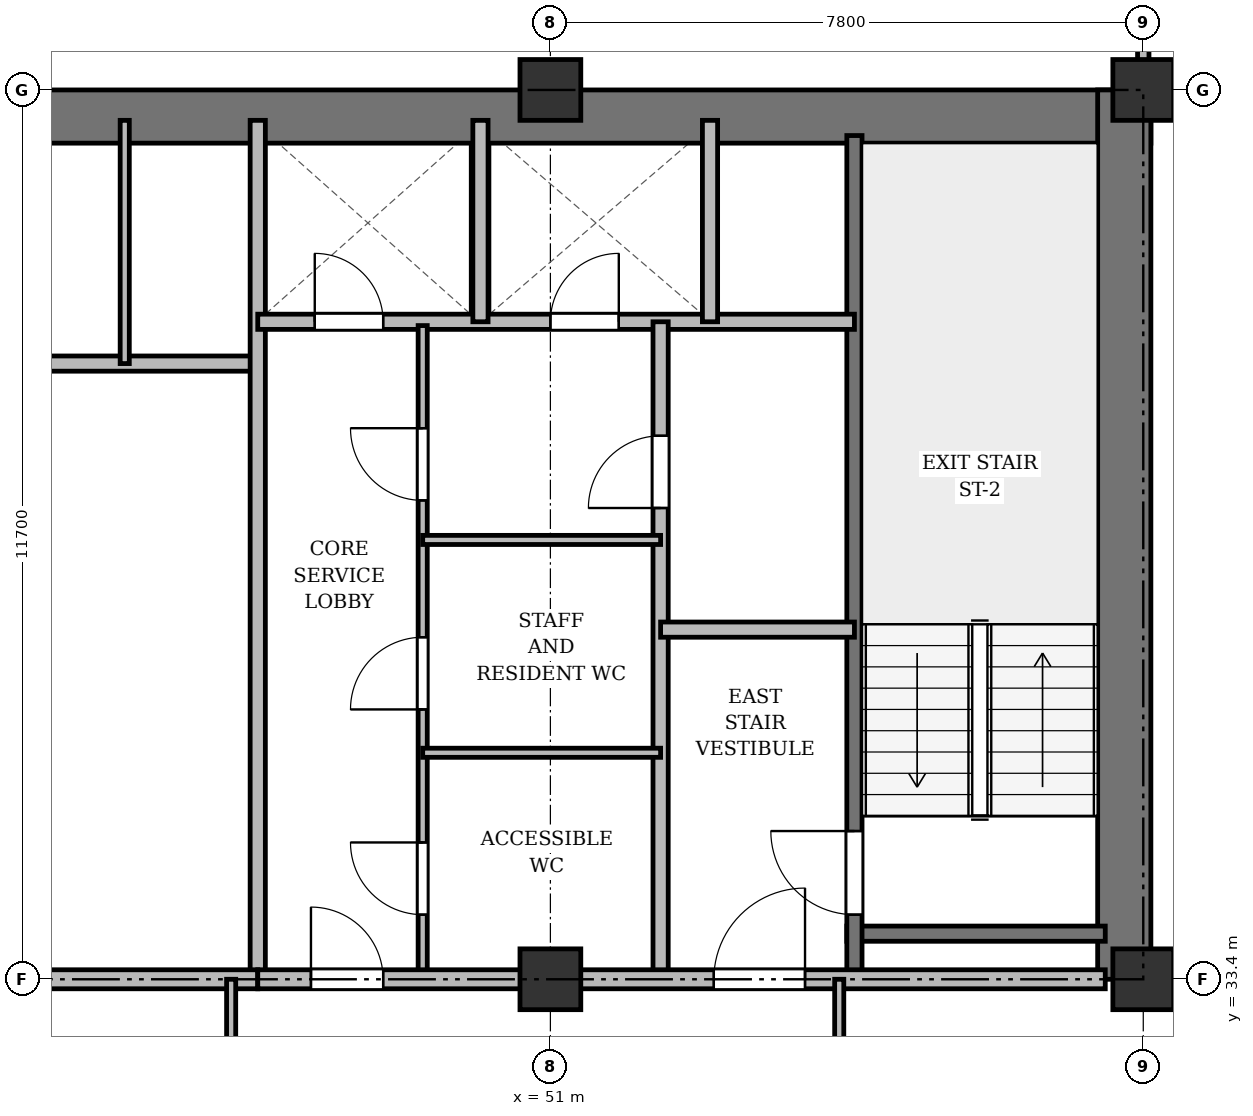
"""IFC4 building model, lengths in metres.
Left out: names, types, materials, properties, quantities, classifications, styles, units other than length and angle.
Written with IfcOpenShell. Run it as: python <this file> out.ifc"""

import sys

from ifc_helpers import new_model, si_unit, direction, frame, frame_2d, origin, origin_2d, place, context, subcontext, project, spatial, rectangle, extrude, source, transform, mapped, element, fill, save


model = new_model("IFC4")
c1 = context("Model", 3, precision=1e-05, world=origin(), true_north=direction((0.0, 1.0)))
c2 = subcontext(c1, "Body", "Model", "MODEL_VIEW")
j1 = project(units=[si_unit("LENGTHUNIT", "METRE"), si_unit("PLANEANGLEUNIT", "RADIAN")], contexts=[c1])
p1 = place(None, origin())
s1 = spatial("IfcSite", under=j1, at=p1, CompositionType="ELEMENT")
p2 = place(p1, origin())
s2 = spatial("IfcBuilding", under=s1, at=p2, CompositionType="ELEMENT")
p3 = place(p2, frame((0.0, 0.0, 99.7)))
s3 = spatial("IfcBuildingStorey", under=s2, at=p3, CompositionType="ELEMENT", Elevation=99.7)
m1 = source(origin(), c2, "Body", "SweptSolid", [
    extrude(rectangle(XDim=0.8, YDim=0.8, at=origin_2d()), origin(), (0.0, 0.0, 1.0), 3.6),
])
for number, where, z_axis, x_axis in (
    (1, (51.0, 33.4, 0.0), (0.0, 0.0, 1.0), (1.0, 0.0, 0.0)),
    (2, (51.0, 45.1, 0.0), (0.0, 0.0, 1.0), (1.0, 0.0, 0.0)),
    (3, (58.8, 33.4, 0.0), (0.0, 0.0, 1.0), (1.0, 0.0, 0.0)),
    (4, (58.8, 45.1, 0.0), (0.0, 0.0, 1.0), (1.0, 0.0, 0.0)),
):
    element("IfcColumn", number, at=place(p3, frame(where, z_axis=z_axis, x_axis=x_axis)), inside=s3, PredefinedType="COLUMN", context=c2, shape_type="MappedRepresentation", body=[
        mapped(m1, transform((0.0, 0.0, 0.0), x_axis=(1.0, 0.0, 0.0), y_axis=(0.0, 1.0, 0.0), z_axis=(0.0, 0.0, 1.0), scale=1.0)),
    ])
p4 = place(p3, frame((15.5, 44.75, 0.0), z_axis=(0.0, 0.0, 1.0), x_axis=(1.0, 0.0, 0.0)))
e5 = element("IfcWall", 5, at=p4, inside=s3, PredefinedType="SHEAR", context=c2, shape_type="SweptSolid", body=[
    extrude(rectangle(XDim=43.4, YDim=0.7, at=frame_2d((21.7, 0.0))), origin(), (0.0, 0.0, 1.0), 3.34),
])
p5 = place(p3, frame((58.55, 33.4, 0.0), z_axis=(0.0, 0.0, 1.0), x_axis=(0.0, 1.0, 0.0)))
e6 = element("IfcWall", 6, at=p5, inside=s3, PredefinedType="SHEAR", context=c2, shape_type="SweptSolid", body=[
    extrude(rectangle(XDim=11.7, YDim=0.7, at=frame_2d((5.85, 0.0))), origin(), (0.0, 0.0, 1.0), 3.34),
])
p6 = place(p3, frame((54.9, 34.0, 0.0), z_axis=(0.0, 0.0, 1.0), x_axis=(1.0, 0.0, 0.0)))
e7 = element("IfcWall", 7, at=p6, inside=s3, PredefinedType="SHEAR", context=c2, shape_type="SweptSolid", body=[
    extrude(rectangle(XDim=3.4, YDim=0.2, at=frame_2d((1.7, 0.0))), origin(), (0.0, 0.0, 1.0), 3.34),
])
p7 = place(p3, frame((55.0, 33.4, 0.0), z_axis=(0.0, 0.0, 1.0), x_axis=(0.0, 1.0, 0.0)))
e8 = element("IfcWall", 8, at=p7, inside=s3, PredefinedType="SHEAR", context=c2, shape_type="SweptSolid", body=[
    extrude(rectangle(XDim=11.1, YDim=0.2, at=frame_2d((5.55, 0.0))), origin(), (0.0, 0.0, 1.0), 3.34),
])
p8 = place(p7, frame((0.85, 0.0, 0.0)))
e9 = element("IfcOpeningElement", 9, at=p8, cuts=e8, PredefinedType="OPENING", context=c2, shape_type="SweptSolid", body=[
    extrude(rectangle(XDim=1.1, YDim=2.15, at=frame_2d((0.55, 1.075))), frame((0.0, 0.11, 0.0), z_axis=(0.0, -1.0, 0.0), x_axis=(1.0, 0.0, 0.0)), (0.0, 0.0, 1.0), 0.22),
])
p9 = place(p3, frame((40.25, 41.5, 0.0), z_axis=(0.0, 0.0, 1.0), x_axis=(1.0, 0.0, 0.0)))
e10 = element("IfcWall", 10, at=p9, inside=s3, PredefinedType="SOLIDWALL", context=c2, shape_type="SweptSolid", body=[
    extrude(rectangle(XDim=6.9, YDim=0.2, at=frame_2d((3.45, 0.0))), origin(), (0.0, 0.0, 1.0), 2.84),
])
p10 = place(p3, frame((45.4, 41.5, 0.0), z_axis=(0.0, 0.0, 1.0), x_axis=(0.0, 1.0, 0.0)))
e11 = element("IfcWall", 11, at=p10, inside=s3, PredefinedType="PARTITIONING", context=c2, shape_type="SweptSolid", body=[
    extrude(rectangle(XDim=3.2, YDim=0.12, at=frame_2d((1.6, 0.0))), origin(), (0.0, 0.0, 1.0), 3.34),
])
p11 = place(p3, frame((47.15, 33.4, 0.0), z_axis=(0.0, 0.0, 1.0), x_axis=(0.0, 1.0, 0.0)))
e12 = element("IfcWall", 12, at=p11, inside=s3, PredefinedType="SOLIDWALL", context=c2, shape_type="SweptSolid", body=[
    extrude(rectangle(XDim=11.3, YDim=0.2, at=frame_2d((5.65, 0.0))), origin(), (0.0, 0.0, 1.0), 2.752),
])
p12 = place(p3, frame((26.3, 33.4, 0.0), z_axis=(0.0, 0.0, 1.0), x_axis=(1.0, 0.0, 0.0)))
e13 = element("IfcWall", 13, at=p12, inside=s3, PredefinedType="PARTITIONING", context=c2, shape_type="SweptSolid", body=[
    extrude(rectangle(XDim=20.85, YDim=0.25, at=frame_2d((10.425, 0.0))), origin(), (0.0, 0.0, 1.0), 2.752),
])
p13 = place(p12, frame((9.2, 0.0, 0.0)))
e14 = element("IfcOpeningElement", 14, at=p13, cuts=e13, PredefinedType="OPENING", context=c2, shape_type="SweptSolid", body=[
    extrude(rectangle(XDim=1.6, YDim=2.2, at=frame_2d((0.8, 1.1))), frame((0.0, 0.135, 0.0), z_axis=(0.0, -1.0, 0.0), x_axis=(1.0, 0.0, 0.0)), (0.0, 0.0, 1.0), 0.27),
])
p14 = place(p3, frame((47.15, 42.05, 0.0), z_axis=(0.0, 0.0, 1.0), x_axis=(1.0, 0.0, 0.0)))
e15 = element("IfcWall", 15, at=p14, inside=s3, PredefinedType="SOLIDWALL", context=c2, shape_type="SweptSolid", body=[
    extrude(rectangle(XDim=7.85, YDim=0.2, at=frame_2d((3.925, 0.0))), origin(), (0.0, 0.0, 1.0), 2.84),
])
p15 = place(p14, frame((0.75, 0.0, 0.0)))
e16 = element("IfcOpeningElement", 16, at=p15, cuts=e15, PredefinedType="OPENING", context=c2, shape_type="SweptSolid", body=[
    extrude(rectangle(XDim=0.9, YDim=2.1, at=frame_2d((0.45, 1.05))), frame((0.0, 0.11, 0.0), z_axis=(0.0, -1.0, 0.0), x_axis=(1.0, 0.0, 0.0)), (0.0, 0.0, 1.0), 0.22),
])
p16 = place(p14, frame((3.85, 0.0, 0.0)))
e17 = element("IfcOpeningElement", 17, at=p16, cuts=e15, PredefinedType="OPENING", context=c2, shape_type="SweptSolid", body=[
    extrude(rectangle(XDim=0.9, YDim=2.1, at=frame_2d((0.45, 1.05))), frame((0.0, 0.11, 0.0), z_axis=(0.0, -1.0, 0.0), x_axis=(1.0, 0.0, 0.0)), (0.0, 0.0, 1.0), 0.22),
])
for number, where, z_axis, x_axis in (
    (18, (50.08, 42.05, 0.0), (0.0, 0.0, 1.0), (0.0, 1.0, 0.0)),
    (19, (53.1, 42.05, 0.0), (0.0, 0.0, 1.0), (0.0, 1.0, 0.0)),
):
    element("IfcWall", number, at=place(p3, frame(where, z_axis=z_axis, x_axis=x_axis)), inside=s3, PredefinedType="SOLIDWALL", context=c2, shape_type="SweptSolid", body=[
        extrude(rectangle(XDim=2.65, YDim=0.2, at=frame_2d((1.325, 0.0))), origin(), (0.0, 0.0, 1.0), 3.34),
    ])
p17 = place(p3, frame((52.45, 33.4, 0.0), z_axis=(0.0, 0.0, 1.0), x_axis=(0.0, 1.0, 0.0)))
e20 = element("IfcWall", 20, at=p17, inside=s3, PredefinedType="PARTITIONING", context=c2, shape_type="SweptSolid", body=[
    extrude(rectangle(XDim=8.65, YDim=0.2, at=frame_2d((4.325, 0.0))), origin(), (0.0, 0.0, 1.0), 2.752),
])
p18 = place(p17, frame((6.2, 0.0, 0.0)))
e21 = element("IfcOpeningElement", 21, at=p18, cuts=e20, PredefinedType="OPENING", context=c2, shape_type="SweptSolid", body=[
    extrude(rectangle(XDim=0.95, YDim=2.15, at=frame_2d((0.475, 1.075))), frame((0.0, 0.11, 0.0), z_axis=(0.0, -1.0, 0.0), x_axis=(1.0, 0.0, 0.0)), (0.0, 0.0, 1.0), 0.22),
])
p19 = place(p3, frame((52.45, 38.0, 0.0), z_axis=(0.0, 0.0, 1.0), x_axis=(1.0, 0.0, 0.0)))
e22 = element("IfcWall", 22, at=p19, inside=s3, PredefinedType="PARTITIONING", context=c2, shape_type="SweptSolid", body=[
    extrude(rectangle(XDim=2.55, YDim=0.2, at=frame_2d((1.275, 0.0))), origin(), (0.0, 0.0, 1.0), 3.34),
])
p20 = place(p3, frame((49.32, 33.4, 0.0), z_axis=(0.0, 0.0, 1.0), x_axis=(0.0, 1.0, 0.0)))
e23 = element("IfcWall", 23, at=p20, inside=s3, PredefinedType="PARTITIONING", context=c2, shape_type="SweptSolid", body=[
    extrude(rectangle(XDim=8.6, YDim=0.12, at=frame_2d((4.3, 0.0))), origin(), (0.0, 0.0, 1.0), 2.752),
])
p21 = place(p20, frame((0.85, 0.0, 0.0)))
e24 = element("IfcOpeningElement", 24, at=p21, cuts=e23, PredefinedType="OPENING", context=c2, shape_type="SweptSolid", body=[
    extrude(rectangle(XDim=0.95, YDim=2.15, at=frame_2d((0.475, 1.075))), frame((0.0, 0.07, 0.0), z_axis=(0.0, -1.0, 0.0), x_axis=(1.0, 0.0, 0.0)), (0.0, 0.0, 1.0), 0.14),
])
p22 = place(p20, frame((3.55, 0.0, 0.0)))
e25 = element("IfcOpeningElement", 25, at=p22, cuts=e23, PredefinedType="OPENING", context=c2, shape_type="SweptSolid", body=[
    extrude(rectangle(XDim=0.95, YDim=2.15, at=frame_2d((0.475, 1.075))), frame((0.0, 0.07, 0.0), z_axis=(0.0, -1.0, 0.0), x_axis=(1.0, 0.0, 0.0)), (0.0, 0.0, 1.0), 0.14),
])
p23 = place(p20, frame((6.3, 0.0, 0.0)))
e26 = element("IfcOpeningElement", 26, at=p23, cuts=e23, PredefinedType="OPENING", context=c2, shape_type="SweptSolid", body=[
    extrude(rectangle(XDim=0.95, YDim=2.15, at=frame_2d((0.475, 1.075))), frame((0.0, 0.07, 0.0), z_axis=(0.0, -1.0, 0.0), x_axis=(1.0, 0.0, 0.0)), (0.0, 0.0, 1.0), 0.14),
])
for number, where, z_axis, x_axis in (
    (27, (49.32, 36.38, 0.0), (0.0, 0.0, 1.0), (1.0, 0.0, 0.0)),
    (28, (49.32, 39.18, 0.0), (0.0, 0.0, 1.0), (1.0, 0.0, 0.0)),
):
    element("IfcWall", number, at=place(p3, frame(where, z_axis=z_axis, x_axis=x_axis)), inside=s3, PredefinedType="PARTITIONING", context=c2, shape_type="SweptSolid", body=[
        extrude(rectangle(XDim=3.13, YDim=0.12, at=frame_2d((1.565, 0.0))), origin(), (0.0, 0.0, 1.0), 2.84),
    ])
p24 = place(p3, frame((47.15, 33.4, 0.0), z_axis=(0.0, 0.0, 1.0), x_axis=(1.0, 0.0, 0.0)))
e29 = element("IfcWall", 29, at=p24, inside=s3, PredefinedType="PARTITIONING", context=c2, shape_type="SweptSolid", body=[
    extrude(rectangle(XDim=11.15, YDim=0.25, at=frame_2d((5.575, 0.0))), origin(), (0.0, 0.0, 1.0), 2.752),
])
p25 = place(p24, frame((0.7, 0.0, 0.0)))
e30 = element("IfcOpeningElement", 30, at=p25, cuts=e29, PredefinedType="OPENING", context=c2, shape_type="SweptSolid", body=[
    extrude(rectangle(XDim=0.95, YDim=2.15, at=frame_2d((0.475, 1.075))), frame((0.0, 0.135, 0.0), z_axis=(0.0, -1.0, 0.0), x_axis=(1.0, 0.0, 0.0)), (0.0, 0.0, 1.0), 0.27),
])
p26 = place(p24, frame((6.0, 0.0, 0.0)))
e31 = element("IfcOpeningElement", 31, at=p26, cuts=e29, PredefinedType="OPENING", context=c2, shape_type="SweptSolid", body=[
    extrude(rectangle(XDim=1.2, YDim=2.15, at=frame_2d((0.6, 1.075))), frame((0.0, 0.135, 0.0), z_axis=(0.0, -1.0, 0.0), x_axis=(1.0, 0.0, 0.0)), (0.0, 0.0, 1.0), 0.27),
])
for number, where, z_axis, x_axis in (
    (32, (46.8, 29.8, 0.0), (0.0, 0.0, 1.0), (0.0, 1.0, 0.0)),
    (33, (54.8, 29.8, 0.0), (0.0, 0.0, 1.0), (0.0, 1.0, 0.0)),
):
    element("IfcWall", number, at=place(p3, frame(where, z_axis=z_axis, x_axis=x_axis)), inside=s3, PredefinedType="PARTITIONING", context=c2, shape_type="SweptSolid", body=[
        extrude(rectangle(XDim=3.6, YDim=0.12, at=frame_2d((1.8, 0.0))), origin(), (0.0, 0.0, 1.0), 2.752),
    ])
p27 = place(p3, frame((58.8, 33.4, 0.0), z_axis=(0.0, 0.0, 1.0), x_axis=(1.0, 0.0, 0.0)))
e34 = element("IfcWall", 34, at=p27, inside=s3, PredefinedType="PARTITIONING", context=c2, shape_type="SweptSolid", body=[
    extrude(rectangle(XDim=10.85, YDim=0.15, at=frame_2d((5.425, 0.0))), origin(), (0.0, 0.0, 1.0), 2.752),
])
p28 = place(p27, frame((4.76, 0.0, 0.0)))
e35 = element("IfcOpeningElement", 35, at=p28, cuts=e34, PredefinedType="OPENING", context=c2, shape_type="SweptSolid", body=[
    extrude(rectangle(XDim=0.95, YDim=2.15, at=frame_2d((0.475, 1.075))), frame((0.0, 0.085, 0.0), z_axis=(0.0, -1.0, 0.0), x_axis=(1.0, 0.0, 0.0)), (0.0, 0.0, 1.0), 0.17),
])
p29 = place(p3, frame((58.8, 44.75, 0.0), z_axis=(0.0, 0.0, 1.0), x_axis=(0.0, 1.0, 0.0)))
e36 = element("IfcWall", 36, at=p29, inside=s3, PredefinedType="PARTITIONING", context=c2, shape_type="SweptSolid", body=[
    extrude(rectangle(XDim=3.61, YDim=0.15, at=frame_2d((1.805, 0.0))), origin(), (0.0, 0.0, 1.0), 2.84),
])
p30 = place(p29, frame((1.1, 0.0, 0.0)))
e37 = element("IfcOpeningElement", 37, at=p30, cuts=e36, PredefinedType="OPENING", context=c2, shape_type="SweptSolid", body=[
    extrude(rectangle(XDim=0.95, YDim=2.15, at=frame_2d((0.475, 1.075))), frame((0.0, 0.085, 0.0), z_axis=(0.0, -1.0, 0.0), x_axis=(1.0, 0.0, 0.0)), (0.0, 0.0, 1.0), 0.17),
])
m2 = source(origin(), c2, "Body", "SweptSolid", [
    extrude(rectangle(XDim=1.1, YDim=2.15, at=frame_2d((0.55, 1.075))), frame((0.0, 0.025, 0.0), z_axis=(0.0, -1.0, 0.0), x_axis=(1.0, 0.0, 0.0)), (0.0, 0.0, 1.0), 0.05),
])
p31 = place(p8, origin())
e38 = element("IfcDoor", 38, at=p31, inside=s3, OperationType="SINGLE_SWING_RIGHT", PredefinedType="DOOR", context=c2, shape_type="MappedRepresentation", body=[
    mapped(m2, transform((0.0, 0.0, 0.0), x_axis=(1.0, 0.0, 0.0), y_axis=(0.0, 1.0, 0.0), z_axis=(0.0, 0.0, 1.0), scale=1.0)),
])
fill(e9, e38)
m3 = source(origin(), c2, "Body", "SweptSolid", [
    extrude(rectangle(XDim=0.9, YDim=2.1, at=frame_2d((0.45, 1.05))), frame((0.0, 0.025, 0.0), z_axis=(0.0, -1.0, 0.0), x_axis=(1.0, 0.0, 0.0)), (0.0, 0.0, 1.0), 0.05),
])
p32 = place(p15, origin())
e39 = element("IfcDoor", 39, at=p32, inside=s3, OperationType="SINGLE_SWING_LEFT", PredefinedType="DOOR", context=c2, shape_type="MappedRepresentation", body=[
    mapped(m3, transform((0.0, 0.0, 0.0), x_axis=(1.0, 0.0, 0.0), y_axis=(0.0, 1.0, 0.0), z_axis=(0.0, 0.0, 1.0), scale=1.0)),
])
fill(e16, e39)
p33 = place(p16, origin())
e40 = element("IfcDoor", 40, at=p33, inside=s3, OperationType="SINGLE_SWING_RIGHT", PredefinedType="DOOR", context=c2, shape_type="MappedRepresentation", body=[
    mapped(m3, transform((0.0, 0.0, 0.0), x_axis=(1.0, 0.0, 0.0), y_axis=(0.0, 1.0, 0.0), z_axis=(0.0, 0.0, 1.0), scale=1.0)),
])
fill(e17, e40)
m4 = source(origin(), c2, "Body", "SweptSolid", [
    extrude(rectangle(XDim=0.95, YDim=2.15, at=frame_2d((0.475, 1.075))), frame((0.0, 0.025, 0.0), z_axis=(0.0, -1.0, 0.0), x_axis=(1.0, 0.0, 0.0)), (0.0, 0.0, 1.0), 0.05),
])
p34 = place(p18, origin())
e41 = element("IfcDoor", 41, at=p34, inside=s3, OperationType="SINGLE_SWING_LEFT", PredefinedType="DOOR", context=c2, shape_type="MappedRepresentation", body=[
    mapped(m4, transform((0.0, 0.0, 0.0), x_axis=(1.0, 0.0, 0.0), y_axis=(0.0, 1.0, 0.0), z_axis=(0.0, 0.0, 1.0), scale=1.0)),
])
fill(e21, e41)
p35 = place(p21, origin())
e42 = element("IfcDoor", 42, at=p35, inside=s3, OperationType="SINGLE_SWING_RIGHT", PredefinedType="DOOR", context=c2, shape_type="MappedRepresentation", body=[
    mapped(m4, transform((0.0, 0.0, 0.0), x_axis=(1.0, 0.0, 0.0), y_axis=(0.0, 1.0, 0.0), z_axis=(0.0, 0.0, 1.0), scale=1.0)),
])
fill(e24, e42)
p36 = place(p22, origin())
e43 = element("IfcDoor", 43, at=p36, inside=s3, OperationType="SINGLE_SWING_LEFT", PredefinedType="DOOR", context=c2, shape_type="MappedRepresentation", body=[
    mapped(m4, transform((0.0, 0.0, 0.0), x_axis=(1.0, 0.0, 0.0), y_axis=(0.0, 1.0, 0.0), z_axis=(0.0, 0.0, 1.0), scale=1.0)),
])
fill(e25, e43)
p37 = place(p23, origin())
e44 = element("IfcDoor", 44, at=p37, inside=s3, OperationType="SINGLE_SWING_RIGHT", PredefinedType="DOOR", context=c2, shape_type="MappedRepresentation", body=[
    mapped(m4, transform((0.0, 0.0, 0.0), x_axis=(1.0, 0.0, 0.0), y_axis=(0.0, 1.0, 0.0), z_axis=(0.0, 0.0, 1.0), scale=1.0)),
])
fill(e26, e44)
p38 = place(p25, origin())
e45 = element("IfcDoor", 45, at=p38, inside=s3, OperationType="SINGLE_SWING_LEFT", PredefinedType="DOOR", context=c2, shape_type="MappedRepresentation", body=[
    mapped(m4, transform((0.0, 0.0, 0.0), x_axis=(1.0, 0.0, 0.0), y_axis=(0.0, 1.0, 0.0), z_axis=(0.0, 0.0, 1.0), scale=1.0)),
])
fill(e30, e45)
m5 = source(origin(), c2, "Body", "SweptSolid", [
    extrude(rectangle(XDim=1.2, YDim=2.15, at=frame_2d((0.6, 1.075))), frame((0.0, 0.025, 0.0), z_axis=(0.0, -1.0, 0.0), x_axis=(1.0, 0.0, 0.0)), (0.0, 0.0, 1.0), 0.05),
])
p39 = place(p26, origin())
e46 = element("IfcDoor", 46, at=p39, inside=s3, OperationType="SINGLE_SWING_RIGHT", PredefinedType="DOOR", context=c2, shape_type="MappedRepresentation", body=[
    mapped(m5, transform((0.0, 0.0, 0.0), x_axis=(1.0, 0.0, 0.0), y_axis=(0.0, 1.0, 0.0), z_axis=(0.0, 0.0, 1.0), scale=1.0)),
])
fill(e31, e46)
save(model, sys.argv[1])
